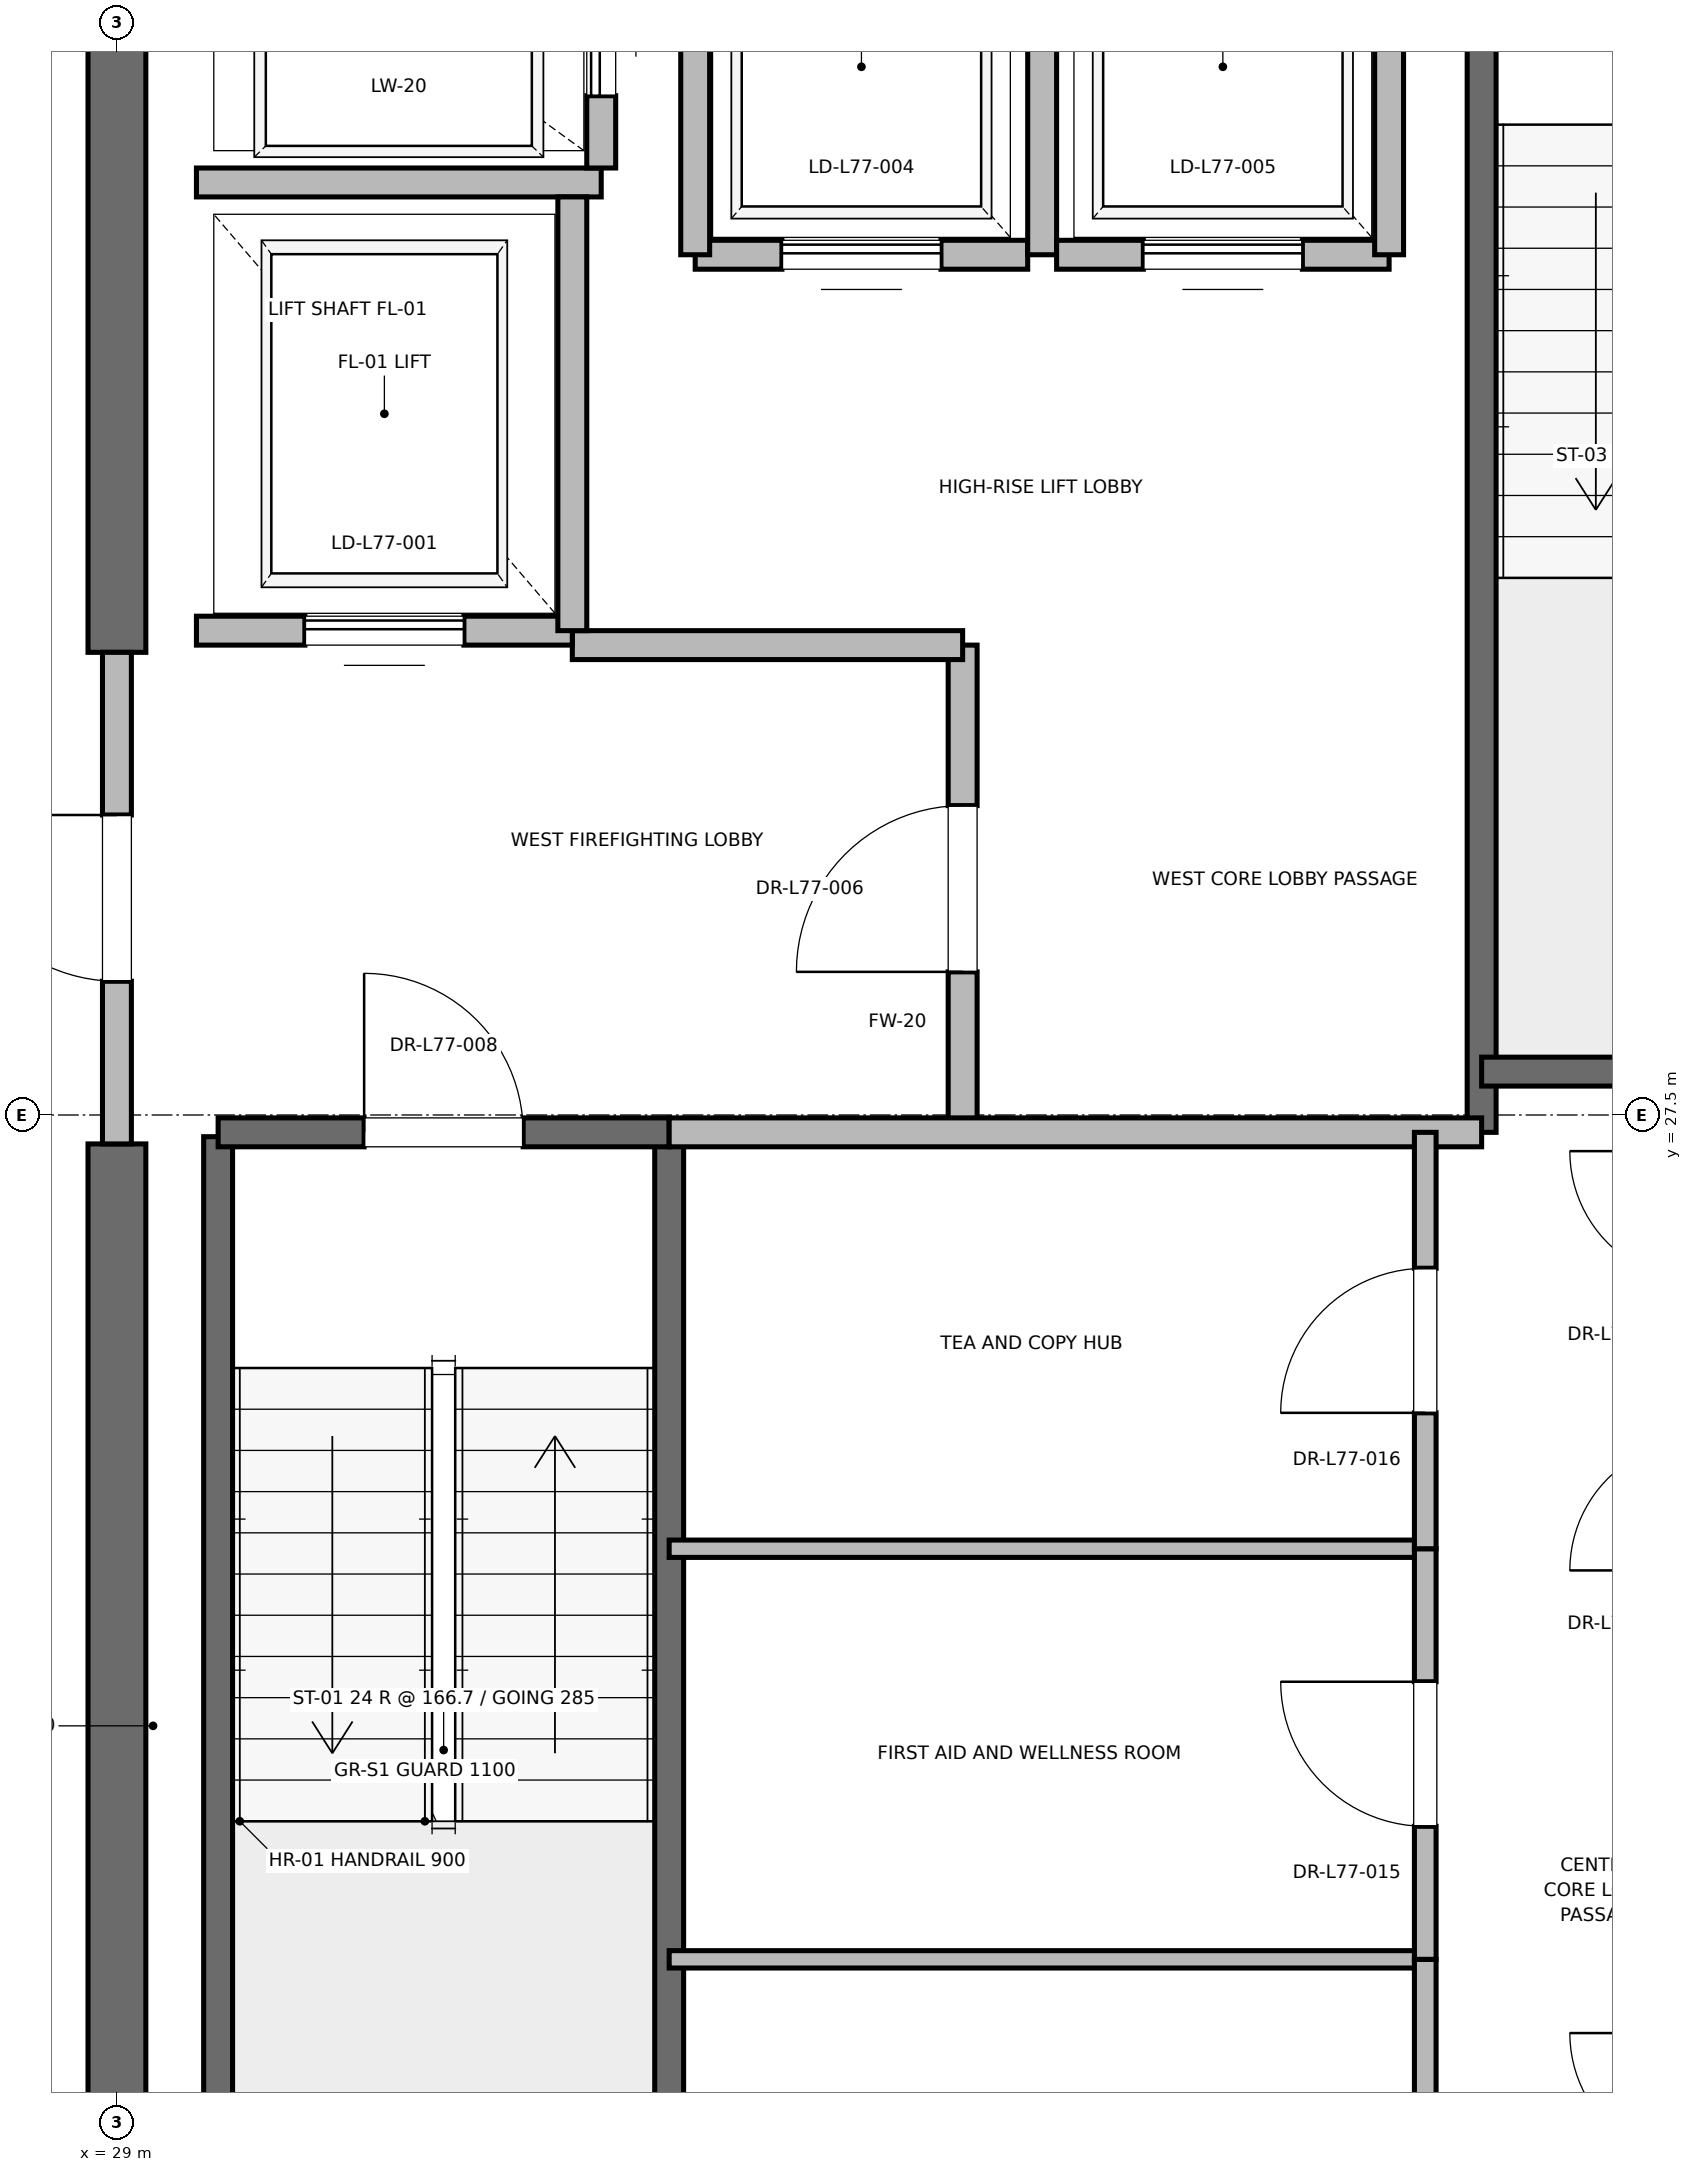
"""IFC4 building model, lengths in metres.
Left out: names, types, materials, properties, quantities, classifications, styles, units other than length and angle.
Written with IfcOpenShell. Run it as: python <this file> out.ifc"""

import sys

from ifc_helpers import new_model, si_unit, direction, frame, frame_2d, origin, place, context, subcontext, project, spatial, rectangle, extrude, element, fill, save


model = new_model("IFC4")
c1 = context("Model", 3, precision=1e-05, world=origin(), true_north=direction((0.0, 1.0)))
c2 = subcontext(c1, "Body", "Model", "MODEL_VIEW")
j1 = project(units=[si_unit("LENGTHUNIT", "METRE"), si_unit("PLANEANGLEUNIT", "RADIAN")], contexts=[c1])
p1 = place(None, origin())
s1 = spatial("IfcSite", under=j1, at=p1, CompositionType="ELEMENT")
p2 = place(p1, origin())
s2 = spatial("IfcBuilding", under=s1, at=p2, CompositionType="ELEMENT")
p3 = place(p2, frame((0.0, 0.0, 330.8)))
s3 = spatial("IfcBuildingStorey", under=s2, at=p3, CompositionType="ELEMENT", Elevation=330.8)
p4 = place(p3, frame((29.0, 18.5, 0.0), z_axis=(0.0, 0.0, 1.0), x_axis=(0.0, 1.0, 0.0)))
e1 = element("IfcWall", 1, at=p4, inside=s3, PredefinedType="SHEAR", context=c2, shape_type="SweptSolid", body=[
    extrude(rectangle(XDim=8.8, YDim=0.4, at=frame_2d((4.4, 0.0))), origin(), (0.0, 0.0, 1.0), 3.785),
])
p5 = place(p3, frame((29.0, 30.7, 0.0), z_axis=(0.0, 0.0, 1.0), x_axis=(0.0, 1.0, 0.0)))
e2 = element("IfcWall", 2, at=p5, inside=s3, PredefinedType="SHEAR", context=c2, shape_type="SweptSolid", body=[
    extrude(rectangle(XDim=5.8, YDim=0.4, at=frame_2d((2.9, 0.0))), origin(), (0.0, 0.0, 1.0), 3.785),
])
p6 = place(p3, frame((29.7, 19.2, 0.0), z_axis=(0.0, 0.0, 1.0), x_axis=(0.0, 1.0, 0.0)))
e3 = element("IfcWall", 3, at=p6, inside=s3, PredefinedType="SOLIDWALL", context=c2, shape_type="SweptSolid", body=[
    extrude(rectangle(XDim=8.15, YDim=0.2, at=frame_2d((4.075, 0.0))), origin(), (0.0, 0.0, 1.0), 3.785),
])
p7 = place(p3, frame((32.82, 18.6, 0.0), z_axis=(0.0, 0.0, 1.0), x_axis=(0.0, 1.0, 0.0)))
e4 = element("IfcWall", 4, at=p7, inside=s3, PredefinedType="SOLIDWALL", context=c2, shape_type="SweptSolid", body=[
    extrude(rectangle(XDim=8.78, YDim=0.2, at=frame_2d((4.39, 0.0))), origin(), (0.0, 0.0, 1.0), 3.785),
])
p8 = place(p3, frame((29.7, 27.38, 0.0), z_axis=(0.0, 0.0, 1.0), x_axis=(1.0, 0.0, 0.0)))
e5 = element("IfcWall", 5, at=p8, inside=s3, PredefinedType="SOLIDWALL", context=c2, shape_type="SweptSolid", body=[
    extrude(rectangle(XDim=3.12, YDim=0.2, at=frame_2d((1.56, 0.0))), origin(), (0.0, 0.0, 1.0), 3.785),
])
p9 = place(p8, frame((1.01, 0.0, 0.0)))
e6 = element("IfcOpeningElement", 6, at=p9, cuts=e5, PredefinedType="OPENING", context=c2, shape_type="SweptSolid", body=[
    extrude(rectangle(XDim=1.1, YDim=2.15, at=frame_2d((0.55, 1.075))), frame((0.0, 0.1, 0.0), z_axis=(0.0, -1.0, 0.0), x_axis=(1.0, 0.0, 0.0)), (0.0, 0.0, 1.0), 0.2),
])
p10 = place(p3, frame((38.44, 27.38, 0.0), z_axis=(0.0, 0.0, 1.0), x_axis=(0.0, 1.0, 0.0)))
e7 = element("IfcWall", 7, at=p10, inside=s3, PredefinedType="SOLIDWALL", context=c2, shape_type="SweptSolid", body=[
    extrude(rectangle(XDim=8.87, YDim=0.2, at=frame_2d((4.435, 0.0))), origin(), (0.0, 0.0, 1.0), 3.785),
])
p11 = place(p3, frame((38.44, 27.8, 0.0), z_axis=(0.0, 0.0, 1.0), x_axis=(1.0, 0.0, 0.0)))
e8 = element("IfcWall", 8, at=p11, inside=s3, PredefinedType="SOLIDWALL", context=c2, shape_type="SweptSolid", body=[
    extrude(rectangle(XDim=3.32, YDim=0.2, at=frame_2d((1.66, 0.0))), origin(), (0.0, 0.0, 1.0), 3.785),
])
p12 = place(p3, frame((34.85, 27.38, 0.0), z_axis=(0.0, 0.0, 1.0), x_axis=(0.0, 1.0, 0.0)))
e9 = element("IfcWall", 9, at=p12, inside=s3, PredefinedType="PARTITIONING", context=c2, shape_type="SweptSolid", body=[
    extrude(rectangle(XDim=3.37, YDim=0.2, at=frame_2d((1.685, 0.0))), origin(), (0.0, 0.0, 1.0), 3.785),
])
p13 = place(p12, frame((1.11, 0.0, 0.0)))
e10 = element("IfcOpeningElement", 10, at=p13, cuts=e9, PredefinedType="OPENING", context=c2, shape_type="SweptSolid", body=[
    extrude(rectangle(XDim=1.15, YDim=2.2, at=frame_2d((0.575, 1.1))), frame((0.0, 0.1, 0.0), z_axis=(0.0, -1.0, 0.0), x_axis=(1.0, 0.0, 0.0)), (0.0, 0.0, 1.0), 0.2),
])
p14 = place(p3, frame((29.0, 27.3, 0.0), z_axis=(0.0, 0.0, 1.0), x_axis=(0.0, 1.0, 0.0)))
e11 = element("IfcWall", 11, at=p14, inside=s3, PredefinedType="PARTITIONING", context=c2, shape_type="SweptSolid", body=[
    extrude(rectangle(XDim=3.4, YDim=0.2, at=frame_2d((1.7, 0.0))), origin(), (0.0, 0.0, 1.0), 2.865),
])
p15 = place(p14, frame((1.125, 0.0, 0.0)))
e12 = element("IfcOpeningElement", 12, at=p15, cuts=e11, PredefinedType="OPENING", context=c2, shape_type="SweptSolid", body=[
    extrude(rectangle(XDim=1.15, YDim=2.2, at=frame_2d((0.575, 1.1))), frame((0.0, 0.1, 0.0), z_axis=(0.0, -1.0, 0.0), x_axis=(1.0, 0.0, 0.0)), (0.0, 0.0, 1.0), 0.2),
])
p16 = place(p3, frame((32.82, 27.38, 0.0), z_axis=(0.0, 0.0, 1.0), x_axis=(1.0, 0.0, 0.0)))
e13 = element("IfcWall", 13, at=p16, inside=s3, PredefinedType="PARTITIONING", context=c2, shape_type="SweptSolid", body=[
    extrude(rectangle(XDim=5.62, YDim=0.2, at=frame_2d((2.81, 0.0))), origin(), (0.0, 0.0, 1.0), 3.785),
])
p17 = place(p3, frame((32.15, 30.75, 0.0), z_axis=(0.0, 0.0, 1.0), x_axis=(1.0, 0.0, 0.0)))
e14 = element("IfcWall", 14, at=p17, inside=s3, PredefinedType="PARTITIONING", context=c2, shape_type="SweptSolid", body=[
    extrude(rectangle(XDim=2.7, YDim=0.2, at=frame_2d((1.35, 0.0))), origin(), (0.0, 0.0, 1.0), 3.785),
])
p18 = place(p3, frame((29.55, 30.85, 0.0), z_axis=(0.0, 0.0, 1.0), x_axis=(1.0, 0.0, 0.0)))
e15 = element("IfcWall", 15, at=p18, inside=s3, PredefinedType="SOLIDWALL", context=c2, shape_type="SweptSolid", body=[
    extrude(rectangle(XDim=2.6, YDim=0.2, at=frame_2d((1.3, 0.0))), origin(), (0.0, 0.0, 1.0), 2.865),
])
p19 = place(p18, frame((0.75, 0.0, 0.0)))
e16 = element("IfcOpeningElement", 16, at=p19, cuts=e15, PredefinedType="OPENING", context=c2, shape_type="SweptSolid", body=[
    extrude(rectangle(XDim=1.1, YDim=2.2, at=frame_2d((0.55, 1.1))), frame((0.0, 0.1, 0.0), z_axis=(0.0, -1.0, 0.0), x_axis=(1.0, 0.0, 0.0)), (0.0, 0.0, 1.0), 0.2),
])
p20 = place(p3, frame((29.55, 33.95, 0.0), z_axis=(0.0, 0.0, 1.0), x_axis=(1.0, 0.0, 0.0)))
e17 = element("IfcWall", 17, at=p20, inside=s3, PredefinedType="SOLIDWALL", context=c2, shape_type="SweptSolid", body=[
    extrude(rectangle(XDim=2.8, YDim=0.2, at=frame_2d((1.4, 0.0))), origin(), (0.0, 0.0, 1.0), 3.785),
])
p21 = place(p3, frame((32.15, 30.85, 0.0), z_axis=(0.0, 0.0, 1.0), x_axis=(0.0, 1.0, 0.0)))
e18 = element("IfcWall", 18, at=p21, inside=s3, PredefinedType="SOLIDWALL", context=c2, shape_type="SweptSolid", body=[
    extrude(rectangle(XDim=3.0, YDim=0.2, at=frame_2d((1.5, 0.0))), origin(), (0.0, 0.0, 1.0), 3.785),
])
p22 = place(p3, frame((32.35, 34.05, 0.0), z_axis=(0.0, 0.0, 1.0), x_axis=(0.0, 1.0, 0.0)))
e19 = element("IfcWall", 19, at=p22, inside=s3, PredefinedType="SOLIDWALL", context=c2, shape_type="SweptSolid", body=[
    extrude(rectangle(XDim=2.1, YDim=0.2, at=frame_2d((1.05, 0.0))), origin(), (0.0, 0.0, 1.0), 3.785),
])
p23 = place(p22, frame((0.5, 0.0, 0.0)))
e20 = element("IfcOpeningElement", 20, at=p23, cuts=e19, PredefinedType="OPENING", context=c2, shape_type="SweptSolid", body=[
    extrude(rectangle(XDim=1.1, YDim=2.2, at=frame_2d((0.55, 1.1))), frame((0.0, 0.1, 0.0), z_axis=(0.0, -1.0, 0.0), x_axis=(1.0, 0.0, 0.0)), (0.0, 0.0, 1.0), 0.2),
])
p24 = place(p3, frame((33.0, 33.45, 0.0), z_axis=(0.0, 0.0, 1.0), x_axis=(1.0, 0.0, 0.0)))
e21 = element("IfcWall", 21, at=p24, inside=s3, PredefinedType="SOLIDWALL", context=c2, shape_type="SweptSolid", body=[
    extrude(rectangle(XDim=2.3, YDim=0.2, at=frame_2d((1.15, 0.0))), origin(), (0.0, 0.0, 1.0), 3.785),
])
p25 = place(p24, frame((0.6, 0.0, 0.0)))
e22 = element("IfcOpeningElement", 22, at=p25, cuts=e21, PredefinedType="OPENING", context=c2, shape_type="SweptSolid", body=[
    extrude(rectangle(XDim=1.1, YDim=2.2, at=frame_2d((0.55, 1.1))), frame((0.0, 0.1, 0.0), z_axis=(0.0, -1.0, 0.0), x_axis=(1.0, 0.0, 0.0)), (0.0, 0.0, 1.0), 0.2),
])
p26 = place(p3, frame((33.0, 36.05, 0.0), z_axis=(0.0, 0.0, 1.0), x_axis=(0.0, -1.0, 0.0)))
e23 = element("IfcWall", 23, at=p26, inside=s3, PredefinedType="SOLIDWALL", context=c2, shape_type="SweptSolid", body=[
    extrude(rectangle(XDim=2.6, YDim=0.2, at=frame_2d((1.3, 0.0))), origin(), (0.0, 0.0, 1.0), 3.785),
])
p27 = place(p3, frame((35.4, 33.45, 0.0), z_axis=(0.0, 0.0, 1.0), x_axis=(0.0, 1.0, 0.0)))
e24 = element("IfcWall", 24, at=p27, inside=s3, PredefinedType="SOLIDWALL", context=c2, shape_type="SweptSolid", body=[
    extrude(rectangle(XDim=2.6, YDim=0.2, at=frame_2d((1.3, 0.0))), origin(), (0.0, 0.0, 1.0), 2.865),
])
p28 = place(p3, frame((35.5, 33.45, 0.0), z_axis=(0.0, 0.0, 1.0), x_axis=(1.0, 0.0, 0.0)))
e25 = element("IfcWall", 25, at=p28, inside=s3, PredefinedType="SOLIDWALL", context=c2, shape_type="SweptSolid", body=[
    extrude(rectangle(XDim=2.3, YDim=0.2, at=frame_2d((1.15, 0.0))), origin(), (0.0, 0.0, 1.0), 3.785),
])
p29 = place(p28, frame((0.6, 0.0, 0.0)))
e26 = element("IfcOpeningElement", 26, at=p29, cuts=e25, PredefinedType="OPENING", context=c2, shape_type="SweptSolid", body=[
    extrude(rectangle(XDim=1.1, YDim=2.2, at=frame_2d((0.55, 1.1))), frame((0.0, 0.1, 0.0), z_axis=(0.0, -1.0, 0.0), x_axis=(1.0, 0.0, 0.0)), (0.0, 0.0, 1.0), 0.2),
])
p30 = place(p3, frame((37.8, 33.45, 0.0), z_axis=(0.0, 0.0, 1.0), x_axis=(0.0, 1.0, 0.0)))
e27 = element("IfcWall", 27, at=p30, inside=s3, PredefinedType="SOLIDWALL", context=c2, shape_type="SweptSolid", body=[
    extrude(rectangle(XDim=2.6, YDim=0.2, at=frame_2d((1.3, 0.0))), origin(), (0.0, 0.0, 1.0), 2.865),
])
for number, where, z_axis, x_axis in (
    (28, (32.82, 21.66, 0.0), (0.0, 0.0, 1.0), (1.0, 0.0, 0.0)),
    (29, (32.82, 24.5, 0.0), (0.0, 0.0, 1.0), (1.0, 0.0, 0.0)),
):
    element("IfcWall", number, at=place(p3, frame(where, z_axis=z_axis, x_axis=x_axis)), inside=s3, PredefinedType="PARTITIONING", context=c2, shape_type="SweptSolid", body=[
        extrude(rectangle(XDim=5.23, YDim=0.12, at=frame_2d((2.615, 0.0))), origin(), (0.0, 0.0, 1.0), 2.85),
    ])
p31 = place(p3, frame((38.05, 18.6, 0.0), z_axis=(0.0, 0.0, 1.0), x_axis=(0.0, 1.0, 0.0)))
e30 = element("IfcWall", 30, at=p31, inside=s3, PredefinedType="PARTITIONING", context=c2, shape_type="SweptSolid", body=[
    extrude(rectangle(XDim=3.06, YDim=0.15, at=frame_2d((1.53, 0.0))), origin(), (0.0, 0.0, 1.0), 2.85),
])
p32 = place(p31, frame((1.03, 0.0, 0.0)))
e31 = element("IfcOpeningElement", 31, at=p32, cuts=e30, PredefinedType="OPENING", context=c2, shape_type="SweptSolid", body=[
    extrude(rectangle(XDim=1.0, YDim=2.15, at=frame_2d((0.5, 1.075))), frame((0.0, 0.075, 0.0), z_axis=(0.0, -1.0, 0.0), x_axis=(1.0, 0.0, 0.0)), (0.0, 0.0, 1.0), 0.15),
])
p33 = place(p3, frame((38.05, 21.66, 0.0), z_axis=(0.0, 0.0, 1.0), x_axis=(0.0, 1.0, 0.0)))
e32 = element("IfcWall", 32, at=p33, inside=s3, PredefinedType="PARTITIONING", context=c2, shape_type="SweptSolid", body=[
    extrude(rectangle(XDim=2.84, YDim=0.15, at=frame_2d((1.42, 0.0))), origin(), (0.0, 0.0, 1.0), 2.85),
])
p34 = place(p33, frame((0.92, 0.0, 0.0)))
e33 = element("IfcOpeningElement", 33, at=p34, cuts=e32, PredefinedType="OPENING", context=c2, shape_type="SweptSolid", body=[
    extrude(rectangle(XDim=1.0, YDim=2.15, at=frame_2d((0.5, 1.075))), frame((0.0, 0.075, 0.0), z_axis=(0.0, -1.0, 0.0), x_axis=(1.0, 0.0, 0.0)), (0.0, 0.0, 1.0), 0.15),
])
p35 = place(p3, frame((38.05, 24.5, 0.0), z_axis=(0.0, 0.0, 1.0), x_axis=(0.0, 1.0, 0.0)))
e34 = element("IfcWall", 34, at=p35, inside=s3, PredefinedType="PARTITIONING", context=c2, shape_type="SweptSolid", body=[
    extrude(rectangle(XDim=2.88, YDim=0.15, at=frame_2d((1.44, 0.0))), origin(), (0.0, 0.0, 1.0), 2.85),
])
p36 = place(p35, frame((0.94, 0.0, 0.0)))
e35 = element("IfcOpeningElement", 35, at=p36, cuts=e34, PredefinedType="OPENING", context=c2, shape_type="SweptSolid", body=[
    extrude(rectangle(XDim=1.0, YDim=2.15, at=frame_2d((0.5, 1.075))), frame((0.0, 0.075, 0.0), z_axis=(0.0, -1.0, 0.0), x_axis=(1.0, 0.0, 0.0)), (0.0, 0.0, 1.0), 0.15),
])
p37 = place(p9, origin())
e36 = element("IfcDoor", 36, at=p37, inside=s3, OperationType="SINGLE_SWING_LEFT", PredefinedType="DOOR", context=c2, shape_type="SweptSolid", body=[
    extrude(rectangle(XDim=1.1, YDim=2.15, at=frame_2d((0.55, 1.075))), frame((0.0, 0.025, 0.0), z_axis=(0.0, -1.0, 0.0), x_axis=(1.0, 0.0, 0.0)), (0.0, 0.0, 1.0), 0.05),
])
fill(e6, e36)
p38 = place(p13, origin())
e37 = element("IfcDoor", 37, at=p38, inside=s3, OperationType="SINGLE_SWING_LEFT", PredefinedType="DOOR", context=c2, shape_type="SweptSolid", body=[
    extrude(rectangle(XDim=1.15, YDim=2.2, at=frame_2d((0.575, 1.1))), frame((0.0, 0.025, 0.0), z_axis=(0.0, -1.0, 0.0), x_axis=(1.0, 0.0, 0.0)), (0.0, 0.0, 1.0), 0.05),
])
fill(e10, e37)
p39 = place(p15, origin())
e38 = element("IfcDoor", 38, at=p39, inside=s3, OperationType="SINGLE_SWING_RIGHT", PredefinedType="DOOR", context=c2, shape_type="SweptSolid", body=[
    extrude(rectangle(XDim=1.15, YDim=2.2, at=frame_2d((0.575, 1.1))), frame((0.0, 0.025, 0.0), z_axis=(0.0, -1.0, 0.0), x_axis=(1.0, 0.0, 0.0)), (0.0, 0.0, 1.0), 0.05),
])
fill(e12, e38)
p40 = place(p19, origin())
e39 = element("IfcDoor", 39, at=p40, inside=s3, OperationType="SLIDING_TO_RIGHT", PredefinedType="DOOR", context=c2, shape_type="SweptSolid", body=[
    extrude(rectangle(XDim=1.1, YDim=2.2, at=frame_2d((0.55, 1.1))), frame((0.0, 0.025, 0.0), z_axis=(0.0, -1.0, 0.0), x_axis=(1.0, 0.0, 0.0)), (0.0, 0.0, 1.0), 0.05),
])
fill(e16, e39)
p41 = place(p23, origin())
e40 = element("IfcDoor", 40, at=p41, inside=s3, OperationType="SLIDING_TO_RIGHT", PredefinedType="DOOR", context=c2, shape_type="SweptSolid", body=[
    extrude(rectangle(XDim=1.1, YDim=2.2, at=frame_2d((0.55, 1.1))), frame((0.0, 0.025, 0.0), z_axis=(0.0, -1.0, 0.0), x_axis=(1.0, 0.0, 0.0)), (0.0, 0.0, 1.0), 0.05),
])
fill(e20, e40)
p42 = place(p25, origin())
e41 = element("IfcDoor", 41, at=p42, inside=s3, OperationType="SLIDING_TO_RIGHT", PredefinedType="DOOR", context=c2, shape_type="SweptSolid", body=[
    extrude(rectangle(XDim=1.1, YDim=2.2, at=frame_2d((0.55, 1.1))), frame((0.0, 0.025, 0.0), z_axis=(0.0, -1.0, 0.0), x_axis=(1.0, 0.0, 0.0)), (0.0, 0.0, 1.0), 0.05),
])
fill(e22, e41)
p43 = place(p29, origin())
e42 = element("IfcDoor", 42, at=p43, inside=s3, OperationType="SLIDING_TO_RIGHT", PredefinedType="DOOR", context=c2, shape_type="SweptSolid", body=[
    extrude(rectangle(XDim=1.1, YDim=2.2, at=frame_2d((0.55, 1.1))), frame((0.0, 0.025, 0.0), z_axis=(0.0, -1.0, 0.0), x_axis=(1.0, 0.0, 0.0)), (0.0, 0.0, 1.0), 0.05),
])
fill(e26, e42)
p44 = place(p34, origin())
e43 = element("IfcDoor", 43, at=p44, inside=s3, OperationType="SINGLE_SWING_RIGHT", PredefinedType="DOOR", context=c2, shape_type="SweptSolid", body=[
    extrude(rectangle(XDim=1.0, YDim=2.15, at=frame_2d((0.5, 1.075))), frame((0.0, 0.025, 0.0), z_axis=(0.0, -1.0, 0.0), x_axis=(1.0, 0.0, 0.0)), (0.0, 0.0, 1.0), 0.05),
])
fill(e33, e43)
p45 = place(p36, origin())
e44 = element("IfcDoor", 44, at=p45, inside=s3, OperationType="SINGLE_SWING_LEFT", PredefinedType="DOOR", context=c2, shape_type="SweptSolid", body=[
    extrude(rectangle(XDim=1.0, YDim=2.15, at=frame_2d((0.5, 1.075))), frame((0.0, 0.025, 0.0), z_axis=(0.0, -1.0, 0.0), x_axis=(1.0, 0.0, 0.0)), (0.0, 0.0, 1.0), 0.05),
])
fill(e35, e44)
save(model, sys.argv[1])
